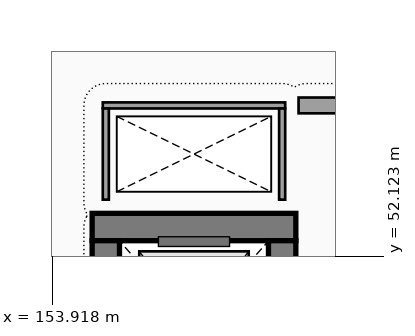
"""IFC4 building model, lengths in metres.
Left out: names, types, materials, properties, quantities, classifications, styles, units other than length and angle.
Written with IfcOpenShell. Run it as: python <this file> out.ifc"""

import sys

from ifc_helpers import new_model, si_unit, direction, frame, frame_2d, origin, place, context, subcontext, project, spatial, rectangle, extrude, element, save


model = new_model("IFC4")
c1 = context("Model", 3, precision=1e-05, world=origin(), true_north=direction((0.0, 1.0)))
c2 = subcontext(c1, "Body", "Model", "MODEL_VIEW")
j1 = project(units=[si_unit("LENGTHUNIT", "METRE"), si_unit("PLANEANGLEUNIT", "RADIAN")], contexts=[c1])
p1 = place(None, origin())
s1 = spatial("IfcSite", under=j1, at=p1, CompositionType="ELEMENT")
p2 = place(p1, origin())
s2 = spatial("IfcBuilding", under=s1, at=p2, CompositionType="ELEMENT")
p3 = place(p2, origin())
s3 = spatial("IfcBuildingStorey", under=s2, at=p3, CompositionType="ELEMENT", Elevation=0.0)
p4 = place(p3, frame((157.925, 52.6, 0.0), z_axis=(0.0, 0.0, 1.0), x_axis=(-1.0, 0.0, 0.0)))
e1 = element("IfcWall", 1, at=p4, inside=s3, PredefinedType="SHEAR", context=c2, shape_type="SweptSolid", body=[
    extrude(rectangle(XDim=3.35, YDim=0.45, at=frame_2d((1.675, 0.0))), origin(), (0.0, 0.0, 1.0), 4.5),
])
p5 = place(p3, frame((154.8, 52.375, 0.0), z_axis=(0.0, 0.0, 1.0), x_axis=(0.0, -1.0, 0.0)))
e2 = element("IfcWall", 2, at=p5, inside=s3, PredefinedType="SHEAR", context=c2, shape_type="SweptSolid", body=[
    extrude(rectangle(XDim=2.75, YDim=0.45, at=frame_2d((1.375, 0.0))), origin(), (0.0, 0.0, 1.0), 4.5),
])
p6 = place(p3, frame((157.7, 49.625, 0.0), z_axis=(0.0, 0.0, 1.0), x_axis=(0.0, 1.0, 0.0)))
e3 = element("IfcWall", 3, at=p6, inside=s3, PredefinedType="SHEAR", context=c2, shape_type="SweptSolid", body=[
    extrude(rectangle(XDim=2.75, YDim=0.45, at=frame_2d((1.375, 0.0))), origin(), (0.0, 0.0, 1.0), 4.5),
])
p7 = place(p6, frame((0.725, 0.0, 0.0), z_axis=(0.0, 0.0, 1.0), x_axis=(1.0, 0.0, 0.0)))
e4 = element("IfcOpeningElement", 4, at=p7, cuts=e3, PredefinedType="OPENING", context=c2, shape_type="SweptSolid", body=[
    extrude(rectangle(XDim=1.3, YDim=2.25, at=frame_2d((0.65, 1.125))), frame((0.0, 0.235, 0.0), z_axis=(0.0, -1.0, 0.0), x_axis=(1.0, 0.0, 0.0)), (0.0, 0.0, 1.0), 0.47),
])
p8 = place(p3, frame((157.75, 54.6, 0.0), z_axis=(0.0, 0.0, 1.0), x_axis=(-1.0, 0.0, 0.0)))
e5 = element("IfcWall", 5, at=p8, inside=s3, PredefinedType="PARTITIONING", context=c2, shape_type="SweptSolid", body=[
    extrude(rectangle(XDim=3.0, YDim=0.1, at=frame_2d((1.5, 0.0))), origin(), (0.0, 0.0, 1.0), 4.5),
])
for number, where, z_axis, x_axis in (
    (6, (154.8, 54.55, 0.0), (0.0, 0.0, 1.0), (0.0, -1.0, 0.0)),
    (7, (157.7, 53.05, 0.0), (0.0, 0.0, 1.0), (0.0, 1.0, 0.0)),
):
    element("IfcWall", number, at=place(p3, frame(where, z_axis=z_axis, x_axis=x_axis)), inside=s3, PredefinedType="PARTITIONING", context=c2, shape_type="SweptSolid", body=[
        extrude(rectangle(XDim=1.5, YDim=0.1, at=frame_2d((0.75, 0.0))), origin(), (0.0, 0.0, 1.0), 4.5),
    ])
p9 = place(p3, frame((161.73, 54.6, 0.0), z_axis=(0.0, 0.0, 1.0), x_axis=(-1.0, 0.0, 0.0)))
e8 = element("IfcWall", 8, at=p9, inside=s3, PredefinedType="SOLIDWALL", context=c2, shape_type="SweptSolid", body=[
    extrude(rectangle(XDim=3.76, YDim=0.26, at=frame_2d((1.88, 0.0))), origin(), (0.0, 0.0, 1.0), 4.5),
])
p10 = place(p9, frame((2.805, 0.0, 0.0), z_axis=(0.0, 0.0, 1.0), x_axis=(-1.0, 0.0, 0.0)))
e9 = element("IfcOpeningElement", 9, at=p10, cuts=e8, PredefinedType="OPENING", context=c2, shape_type="SweptSolid", body=[
    extrude(rectangle(XDim=1.85, YDim=2.25, at=frame_2d((0.925, 1.125))), frame((0.0, 0.14, 0.0), z_axis=(0.0, -1.0, 0.0), x_axis=(1.0, 0.0, 0.0)), (0.0, 0.0, 1.0), 0.28),
])
save(model, sys.argv[1])
